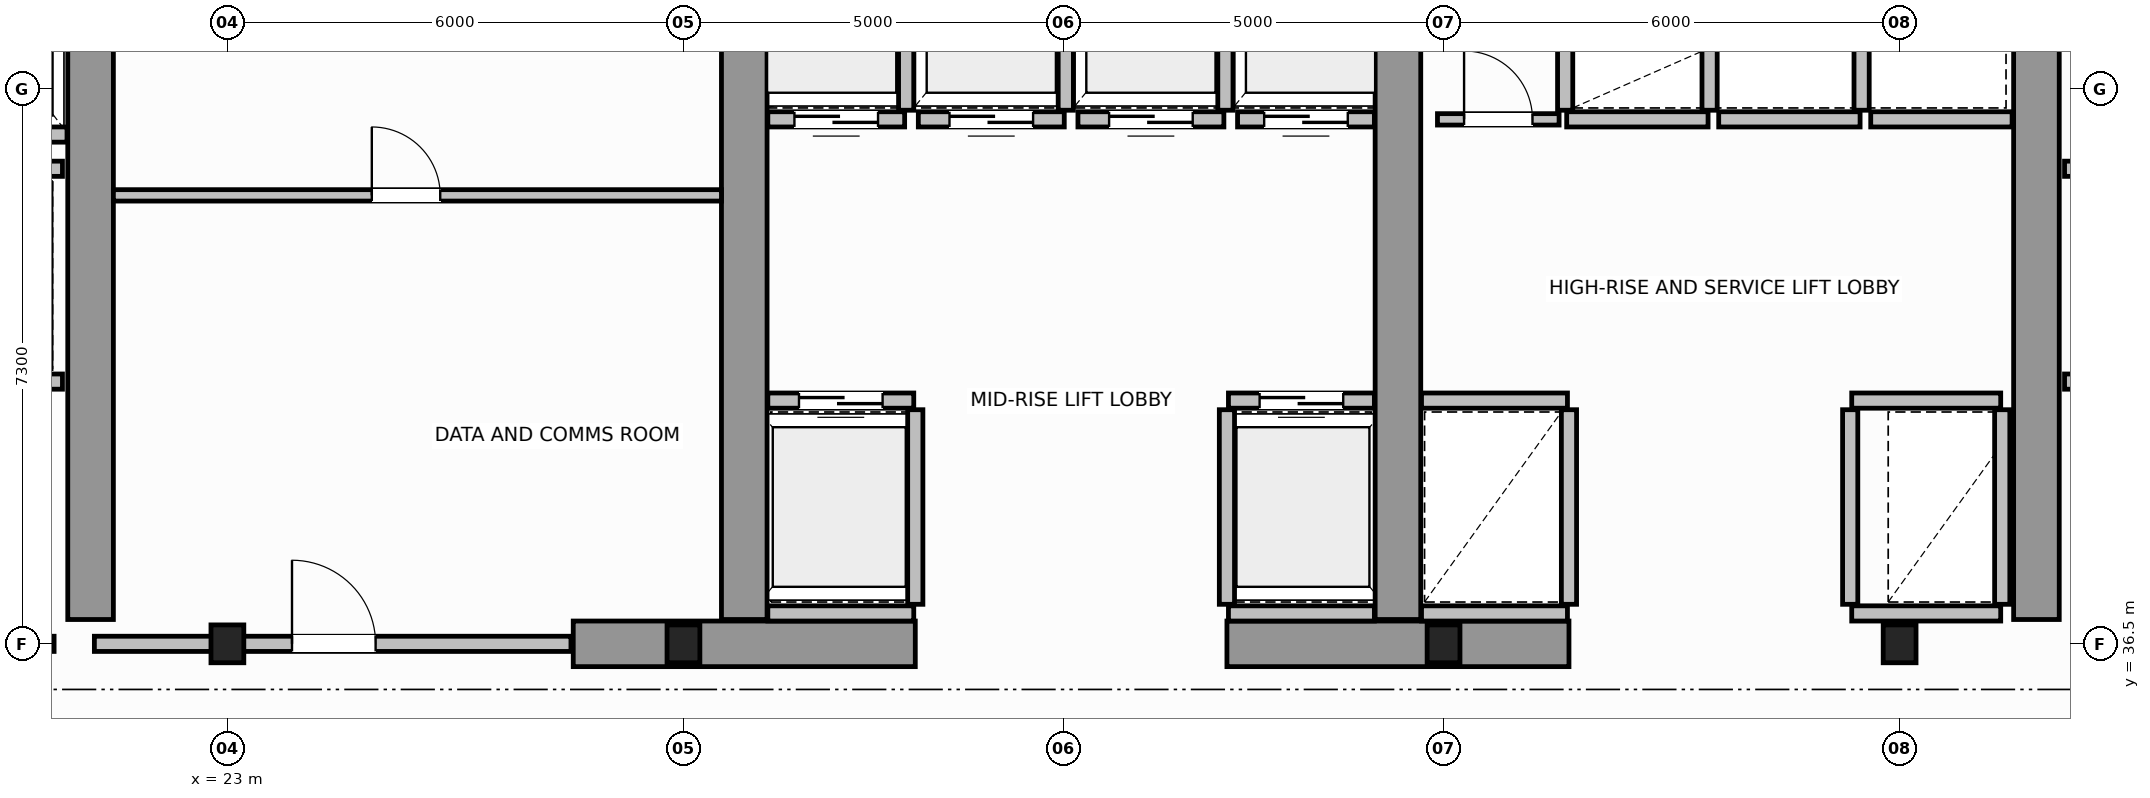
"""IFC4 building model, lengths in metres.
Left out: names, types, materials, properties, quantities, classifications, styles, units other than length and angle.
Written with IfcOpenShell. Run it as: python <this file> out.ifc"""

import sys

from ifc_helpers import new_model, si_unit, direction, frame, frame_2d, origin, origin_2d, place, context, subcontext, project, spatial, rectangle, i_section, extrude, source, transform, mapped, element, fill, save


model = new_model("IFC4")
c1 = context("Model", 3, precision=1e-05, world=origin(), true_north=direction((0.0, 1.0)))
c2 = subcontext(c1, "Body", "Model", "MODEL_VIEW")
j1 = project(units=[si_unit("LENGTHUNIT", "METRE"), si_unit("PLANEANGLEUNIT", "RADIAN")], contexts=[c1])
p1 = place(None, origin())
s1 = spatial("IfcSite", under=j1, at=p1, CompositionType="ELEMENT")
p2 = place(p1, origin())
s2 = spatial("IfcBuilding", under=s1, at=p2, CompositionType="ELEMENT")
p3 = place(p2, frame((0.0, 0.0, 169.0)))
s3 = spatial("IfcBuildingStorey", under=s2, at=p3, CompositionType="ELEMENT", Elevation=169.0)
m1 = source(origin(), c2, "Body", "SweptSolid", [
    extrude(i_section(OverallWidth=0.432, OverallDepth=0.498, WebThickness=0.055, FlangeThickness=0.068, FilletRadius=0.015, at=origin_2d()), origin(), (0.0, 0.0, 1.0), 3.8),
])
for number, where, z_axis, x_axis in (
    (1, (23.0, 36.5, 0.0), (0.0, 0.0, 1.0), (1.0, 0.0, 0.0)),
    (2, (29.0, 36.5, 0.0), (0.0, 0.0, 1.0), (1.0, 0.0, 0.0)),
    (3, (39.0, 36.5, 0.0), (0.0, 0.0, 1.0), (1.0, 0.0, 0.0)),
    (4, (45.0, 36.5, 0.0), (0.0, 0.0, 1.0), (1.0, 0.0, 0.0)),
):
    element("IfcColumn", number, at=place(p3, frame(where, z_axis=z_axis, x_axis=x_axis)), inside=s3, PredefinedType="COLUMN", context=c2, shape_type="MappedRepresentation", body=[
        mapped(m1, transform((0.0, 0.0, 0.0), scale=1.0)),
    ])
for number, where, z_axis, x_axis in (
    (5, (27.55, 36.5, 0.0), (0.0, 0.0, 1.0), (1.0, 0.0, 0.0)),
    (6, (36.15, 36.5, 0.0), (0.0, 0.0, 1.0), (1.0, 0.0, 0.0)),
):
    element("IfcWall", number, at=place(p3, frame(where, z_axis=z_axis, x_axis=x_axis)), inside=s3, PredefinedType="SHEAR", context=c2, shape_type="SweptSolid", body=[
        extrude(rectangle(XDim=4.5, YDim=0.6, at=frame_2d((2.25, 0.0))), origin(), (0.0, 0.0, 1.0), 3.8),
    ])
for number, where, z_axis, x_axis in (
    (7, (21.2, 36.82, 0.0), (0.0, 0.0, 1.0), (0.0, 1.0, 0.0)),
    (8, (29.8, 36.82, 0.0), (0.0, 0.0, 1.0), (0.0, 1.0, 0.0)),
    (9, (38.4, 36.82, 0.0), (0.0, 0.0, 1.0), (0.0, 1.0, 0.0)),
    (10, (46.8, 36.82, 0.0), (0.0, 0.0, 1.0), (0.0, 1.0, 0.0)),
):
    element("IfcWall", number, at=place(p3, frame(where, z_axis=z_axis, x_axis=x_axis)), inside=s3, PredefinedType="SHEAR", context=c2, shape_type="SweptSolid", body=[
        extrude(rectangle(XDim=9.38, YDim=0.6, at=frame_2d((4.69, 0.0))), origin(), (0.0, 0.0, 1.0), 3.8),
    ])
p4 = place(p3, frame((18.25, 36.5, 0.0), z_axis=(0.0, 0.0, 1.0), x_axis=(1.0, 0.0, 0.0)))
e11 = element("IfcWall", 11, at=p4, inside=s3, PredefinedType="SOLIDWALL", context=c2, shape_type="SweptSolid", body=[
    extrude(rectangle(XDim=2.47, YDim=0.2, at=frame_2d((1.235, 0.0))), origin(), (0.0, 0.0, 1.0), 2.57),
])
p5 = place(p4, frame((0.65, 0.0, 0.0)))
e12 = element("IfcOpeningElement", 12, at=p5, cuts=e11, PredefinedType="OPENING", context=c2, shape_type="SweptSolid", body=[
    extrude(rectangle(XDim=1.1, YDim=2.15, at=frame_2d((0.55, 1.075))), frame((0.0, 0.11, 0.0), z_axis=(0.0, -1.0, 0.0), x_axis=(1.0, 0.0, 0.0)), (0.0, 0.0, 1.0), 0.22),
])
p6 = place(p3, frame((30.11, 39.7, 0.0), z_axis=(0.0, 0.0, 1.0), x_axis=(1.0, 0.0, 0.0)))
e13 = element("IfcWall", 13, at=p6, inside=s3, PredefinedType="SOLIDWALL", context=c2, shape_type="SweptSolid", body=[
    extrude(rectangle(XDim=1.92, YDim=0.2, at=frame_2d((0.96, 0.0))), origin(), (0.0, 0.0, 1.0), 3.58),
])
p7 = place(p6, frame((0.41, 0.0, 0.0)))
e14 = element("IfcOpeningElement", 14, at=p7, cuts=e13, PredefinedType="OPENING", context=c2, shape_type="SweptSolid", body=[
    extrude(rectangle(XDim=1.1, YDim=2.15, at=frame_2d((0.55, 1.075))), frame((0.0, 0.11, 0.0), z_axis=(0.0, -1.0, 0.0), x_axis=(1.0, 0.0, 0.0)), (0.0, 0.0, 1.0), 0.22),
])
p8 = place(p3, frame((30.11, 36.9, 0.0), z_axis=(0.0, 0.0, 1.0), x_axis=(1.0, 0.0, 0.0)))
e15 = element("IfcWall", 15, at=p8, inside=s3, PredefinedType="SOLIDWALL", context=c2, shape_type="SweptSolid", body=[
    extrude(rectangle(XDim=1.92, YDim=0.2, at=frame_2d((0.96, 0.0))), origin(), (0.0, 0.0, 1.0), 3.58),
])
p9 = place(p3, frame((32.05, 37.02, 0.0), z_axis=(0.0, 0.0, 1.0), x_axis=(0.0, 1.0, 0.0)))
e16 = element("IfcWall", 16, at=p9, inside=s3, PredefinedType="SOLIDWALL", context=c2, shape_type="SweptSolid", body=[
    extrude(rectangle(XDim=2.56, YDim=0.2, at=frame_2d((1.28, 0.0))), origin(), (0.0, 0.0, 1.0), 3.58),
])
p10 = place(p3, frame((36.17, 39.7, 0.0), z_axis=(0.0, 0.0, 1.0), x_axis=(1.0, 0.0, 0.0)))
e17 = element("IfcWall", 17, at=p10, inside=s3, PredefinedType="SOLIDWALL", context=c2, shape_type="SweptSolid", body=[
    extrude(rectangle(XDim=1.92, YDim=0.2, at=frame_2d((0.96, 0.0))), origin(), (0.0, 0.0, 1.0), 3.58),
])
p11 = place(p10, frame((0.41, 0.0, 0.0)))
e18 = element("IfcOpeningElement", 18, at=p11, cuts=e17, PredefinedType="OPENING", context=c2, shape_type="SweptSolid", body=[
    extrude(rectangle(XDim=1.1, YDim=2.15, at=frame_2d((0.55, 1.075))), frame((0.0, 0.11, 0.0), z_axis=(0.0, -1.0, 0.0), x_axis=(1.0, 0.0, 0.0)), (0.0, 0.0, 1.0), 0.22),
])
p12 = place(p3, frame((36.17, 36.9, 0.0), z_axis=(0.0, 0.0, 1.0), x_axis=(1.0, 0.0, 0.0)))
e19 = element("IfcWall", 19, at=p12, inside=s3, PredefinedType="SOLIDWALL", context=c2, shape_type="SweptSolid", body=[
    extrude(rectangle(XDim=1.92, YDim=0.2, at=frame_2d((0.96, 0.0))), origin(), (0.0, 0.0, 1.0), 3.58),
])
p13 = place(p3, frame((36.15, 37.02, 0.0), z_axis=(0.0, 0.0, 1.0), x_axis=(0.0, 1.0, 0.0)))
e20 = element("IfcWall", 20, at=p13, inside=s3, PredefinedType="SOLIDWALL", context=c2, shape_type="SweptSolid", body=[
    extrude(rectangle(XDim=2.56, YDim=0.2, at=frame_2d((1.28, 0.0))), origin(), (0.0, 0.0, 1.0), 3.58),
])
p14 = place(p3, frame((30.11, 43.4, 0.0), z_axis=(0.0, 0.0, 1.0), x_axis=(1.0, 0.0, 0.0)))
e21 = element("IfcWall", 21, at=p14, inside=s3, PredefinedType="SOLIDWALL", context=c2, shape_type="SweptSolid", body=[
    extrude(rectangle(XDim=1.8, YDim=0.2, at=frame_2d((0.9, 0.0))), origin(), (0.0, 0.0, 1.0), 3.58),
])
p15 = place(p14, frame((0.35, 0.0, 0.0)))
e22 = element("IfcOpeningElement", 22, at=p15, cuts=e21, PredefinedType="OPENING", context=c2, shape_type="SweptSolid", body=[
    extrude(rectangle(XDim=1.1, YDim=2.15, at=frame_2d((0.55, 1.075))), frame((0.0, 0.11, 0.0), z_axis=(0.0, -1.0, 0.0), x_axis=(1.0, 0.0, 0.0)), (0.0, 0.0, 1.0), 0.22),
])
p16 = place(p3, frame((31.93, 43.52, 0.0), z_axis=(0.0, 0.0, 1.0), x_axis=(0.0, 1.0, 0.0)))
e23 = element("IfcWall", 23, at=p16, inside=s3, PredefinedType="SOLIDWALL", context=c2, shape_type="SweptSolid", body=[
    extrude(rectangle(XDim=2.56, YDim=0.2, at=frame_2d((1.28, 0.0))), origin(), (0.0, 0.0, 1.0), 3.58),
])
p17 = place(p3, frame((32.09, 43.4, 0.0), z_axis=(0.0, 0.0, 1.0), x_axis=(1.0, 0.0, 0.0)))
e24 = element("IfcWall", 24, at=p17, inside=s3, PredefinedType="SOLIDWALL", context=c2, shape_type="SweptSolid", body=[
    extrude(rectangle(XDim=1.92, YDim=0.2, at=frame_2d((0.96, 0.0))), origin(), (0.0, 0.0, 1.0), 3.58),
])
p18 = place(p17, frame((0.41, 0.0, 0.0)))
e25 = element("IfcOpeningElement", 25, at=p18, cuts=e24, PredefinedType="OPENING", context=c2, shape_type="SweptSolid", body=[
    extrude(rectangle(XDim=1.1, YDim=2.15, at=frame_2d((0.55, 1.075))), frame((0.0, 0.11, 0.0), z_axis=(0.0, -1.0, 0.0), x_axis=(1.0, 0.0, 0.0)), (0.0, 0.0, 1.0), 0.22),
])
p19 = place(p3, frame((34.03, 43.52, 0.0), z_axis=(0.0, 0.0, 1.0), x_axis=(0.0, 1.0, 0.0)))
e26 = element("IfcWall", 26, at=p19, inside=s3, PredefinedType="SOLIDWALL", context=c2, shape_type="SweptSolid", body=[
    extrude(rectangle(XDim=2.56, YDim=0.2, at=frame_2d((1.28, 0.0))), origin(), (0.0, 0.0, 1.0), 3.58),
])
p20 = place(p3, frame((34.19, 43.4, 0.0), z_axis=(0.0, 0.0, 1.0), x_axis=(1.0, 0.0, 0.0)))
e27 = element("IfcWall", 27, at=p20, inside=s3, PredefinedType="SOLIDWALL", context=c2, shape_type="SweptSolid", body=[
    extrude(rectangle(XDim=1.92, YDim=0.2, at=frame_2d((0.96, 0.0))), origin(), (0.0, 0.0, 1.0), 3.58),
])
p21 = place(p20, frame((0.41, 0.0, 0.0)))
e28 = element("IfcOpeningElement", 28, at=p21, cuts=e27, PredefinedType="OPENING", context=c2, shape_type="SweptSolid", body=[
    extrude(rectangle(XDim=1.1, YDim=2.15, at=frame_2d((0.55, 1.075))), frame((0.0, 0.11, 0.0), z_axis=(0.0, -1.0, 0.0), x_axis=(1.0, 0.0, 0.0)), (0.0, 0.0, 1.0), 0.22),
])
p22 = place(p3, frame((36.13, 43.52, 0.0), z_axis=(0.0, 0.0, 1.0), x_axis=(0.0, 1.0, 0.0)))
e29 = element("IfcWall", 29, at=p22, inside=s3, PredefinedType="SOLIDWALL", context=c2, shape_type="SweptSolid", body=[
    extrude(rectangle(XDim=2.56, YDim=0.2, at=frame_2d((1.28, 0.0))), origin(), (0.0, 0.0, 1.0), 3.58),
])
p23 = place(p3, frame((36.29, 43.4, 0.0), z_axis=(0.0, 0.0, 1.0), x_axis=(1.0, 0.0, 0.0)))
e30 = element("IfcWall", 30, at=p23, inside=s3, PredefinedType="SOLIDWALL", context=c2, shape_type="SweptSolid", body=[
    extrude(rectangle(XDim=1.8, YDim=0.2, at=frame_2d((0.9, 0.0))), origin(), (0.0, 0.0, 1.0), 3.58),
])
p24 = place(p23, frame((0.35, 0.0, 0.0)))
e31 = element("IfcOpeningElement", 31, at=p24, cuts=e30, PredefinedType="OPENING", context=c2, shape_type="SweptSolid", body=[
    extrude(rectangle(XDim=1.1, YDim=2.15, at=frame_2d((0.55, 1.075))), frame((0.0, 0.11, 0.0), z_axis=(0.0, -1.0, 0.0), x_axis=(1.0, 0.0, 0.0)), (0.0, 0.0, 1.0), 0.22),
])
for number, where, z_axis, x_axis in (
    (32, (38.71, 39.7, 0.0), (0.0, 0.0, 1.0), (1.0, 0.0, 0.0)),
    (33, (38.71, 36.9, 0.0), (0.0, 0.0, 1.0), (1.0, 0.0, 0.0)),
):
    element("IfcWall", number, at=place(p3, frame(where, z_axis=z_axis, x_axis=x_axis)), inside=s3, PredefinedType="SOLIDWALL", context=c2, shape_type="SweptSolid", body=[
        extrude(rectangle(XDim=1.92, YDim=0.2, at=frame_2d((0.96, 0.0))), origin(), (0.0, 0.0, 1.0), 3.58),
    ])
p25 = place(p3, frame((40.65, 37.02, 0.0), z_axis=(0.0, 0.0, 1.0), x_axis=(0.0, 1.0, 0.0)))
e34 = element("IfcWall", 34, at=p25, inside=s3, PredefinedType="SOLIDWALL", context=c2, shape_type="SweptSolid", body=[
    extrude(rectangle(XDim=2.56, YDim=0.2, at=frame_2d((1.28, 0.0))), origin(), (0.0, 0.0, 1.0), 3.58),
])
p26 = place(p3, frame((44.37, 39.7, 0.0), z_axis=(0.0, 0.0, 1.0), x_axis=(1.0, 0.0, 0.0)))
e35 = element("IfcWall", 35, at=p26, inside=s3, PredefinedType="SOLIDWALL", context=c2, shape_type="SweptSolid", body=[
    extrude(rectangle(XDim=1.96, YDim=0.2, at=frame_2d((0.98, 0.0))), origin(), (0.0, 0.0, 1.0), 3.58),
])
p27 = place(p3, frame((44.37, 36.9, 0.0), z_axis=(0.0, 0.0, 1.0), x_axis=(1.0, 0.0, 0.0)))
e36 = element("IfcWall", 36, at=p27, inside=s3, PredefinedType="SOLIDWALL", context=c2, shape_type="SweptSolid", body=[
    extrude(rectangle(XDim=1.96, YDim=0.2, at=frame_2d((0.98, 0.0))), origin(), (0.0, 0.0, 1.0), 2.57),
])
for number, where, z_axis, x_axis in (
    (37, (44.35, 37.02, 0.0), (0.0, 0.0, 1.0), (0.0, 1.0, 0.0)),
    (38, (46.35, 37.02, 0.0), (0.0, 0.0, 1.0), (0.0, 1.0, 0.0)),
):
    element("IfcWall", number, at=place(p3, frame(where, z_axis=z_axis, x_axis=x_axis)), inside=s3, PredefinedType="SOLIDWALL", context=c2, shape_type="SweptSolid", body=[
        extrude(rectangle(XDim=2.56, YDim=0.2, at=frame_2d((1.28, 0.0))), origin(), (0.0, 0.0, 1.0), 3.58),
    ])
p28 = place(p3, frame((40.62, 43.4, 0.0), z_axis=(0.0, 0.0, 1.0), x_axis=(1.0, 0.0, 0.0)))
e39 = element("IfcWall", 39, at=p28, inside=s3, PredefinedType="SOLIDWALL", context=c2, shape_type="SweptSolid", body=[
    extrude(rectangle(XDim=1.86, YDim=0.2, at=frame_2d((0.93, 0.0))), origin(), (0.0, 0.0, 1.0), 3.58),
])
for number, where, z_axis, x_axis in (
    (40, (40.6, 43.52, 0.0), (0.0, 0.0, 1.0), (0.0, 1.0, 0.0)),
    (41, (42.5, 43.52, 0.0), (0.0, 0.0, 1.0), (0.0, 1.0, 0.0)),
):
    element("IfcWall", number, at=place(p3, frame(where, z_axis=z_axis, x_axis=x_axis)), inside=s3, PredefinedType="SOLIDWALL", context=c2, shape_type="SweptSolid", body=[
        extrude(rectangle(XDim=2.56, YDim=0.2, at=frame_2d((1.28, 0.0))), origin(), (0.0, 0.0, 1.0), 3.58),
    ])
p29 = place(p3, frame((42.62, 43.4, 0.0), z_axis=(0.0, 0.0, 1.0), x_axis=(1.0, 0.0, 0.0)))
e42 = element("IfcWall", 42, at=p29, inside=s3, PredefinedType="SOLIDWALL", context=c2, shape_type="SweptSolid", body=[
    extrude(rectangle(XDim=1.86, YDim=0.2, at=frame_2d((0.93, 0.0))), origin(), (0.0, 0.0, 1.0), 3.58),
])
p30 = place(p3, frame((44.5, 43.52, 0.0), z_axis=(0.0, 0.0, 1.0), x_axis=(0.0, 1.0, 0.0)))
e43 = element("IfcWall", 43, at=p30, inside=s3, PredefinedType="SOLIDWALL", context=c2, shape_type="SweptSolid", body=[
    extrude(rectangle(XDim=2.56, YDim=0.2, at=frame_2d((1.28, 0.0))), origin(), (0.0, 0.0, 1.0), 3.58),
])
p31 = place(p3, frame((44.62, 43.4, 0.0), z_axis=(0.0, 0.0, 1.0), x_axis=(1.0, 0.0, 0.0)))
e44 = element("IfcWall", 44, at=p31, inside=s3, PredefinedType="SOLIDWALL", context=c2, shape_type="SweptSolid", body=[
    extrude(rectangle(XDim=1.86, YDim=0.2, at=frame_2d((0.93, 0.0))), origin(), (0.0, 0.0, 1.0), 3.58),
])
p32 = place(p3, frame((18.67, 43.2, 0.0), z_axis=(0.0, 0.0, 1.0), x_axis=(1.0, 0.0, 0.0)))
e45 = element("IfcWall", 45, at=p32, inside=s3, PredefinedType="SOLIDWALL", context=c2, shape_type="SweptSolid", body=[
    extrude(rectangle(XDim=2.22, YDim=0.2, at=frame_2d((1.11, 0.0))), origin(), (0.0, 0.0, 1.0), 3.58),
])
p33 = place(p3, frame((18.67, 39.95, 0.0), z_axis=(0.0, 0.0, 1.0), x_axis=(1.0, 0.0, 0.0)))
e46 = element("IfcWall", 46, at=p33, inside=s3, PredefinedType="SOLIDWALL", context=c2, shape_type="SweptSolid", body=[
    extrude(rectangle(XDim=2.16, YDim=0.2, at=frame_2d((1.08, 0.0))), origin(), (0.0, 0.0, 1.0), 3.58),
])
p34 = place(p33, frame((0.53, 0.0, 0.0)))
e47 = element("IfcOpeningElement", 47, at=p34, cuts=e46, PredefinedType="OPENING", context=c2, shape_type="SweptSolid", body=[
    extrude(rectangle(XDim=1.1, YDim=2.15, at=frame_2d((0.55, 1.075))), frame((0.0, 0.11, 0.0), z_axis=(0.0, -1.0, 0.0), x_axis=(1.0, 0.0, 0.0)), (0.0, 0.0, 1.0), 0.22),
])
p35 = place(p3, frame((18.67, 42.75, 0.0), z_axis=(0.0, 0.0, 1.0), x_axis=(1.0, 0.0, 0.0)))
e48 = element("IfcWall", 48, at=p35, inside=s3, PredefinedType="SOLIDWALL", context=c2, shape_type="SweptSolid", body=[
    extrude(rectangle(XDim=2.16, YDim=0.2, at=frame_2d((1.08, 0.0))), origin(), (0.0, 0.0, 1.0), 3.58),
])
p36 = place(p3, frame((47.17, 39.95, 0.0), z_axis=(0.0, 0.0, 1.0), x_axis=(1.0, 0.0, 0.0)))
e49 = element("IfcWall", 49, at=p36, inside=s3, PredefinedType="SOLIDWALL", context=c2, shape_type="SweptSolid", body=[
    extrude(rectangle(XDim=2.16, YDim=0.2, at=frame_2d((1.08, 0.0))), origin(), (0.0, 0.0, 1.0), 3.58),
])
p37 = place(p36, frame((0.53, 0.0, 0.0)))
e50 = element("IfcOpeningElement", 50, at=p37, cuts=e49, PredefinedType="OPENING", context=c2, shape_type="SweptSolid", body=[
    extrude(rectangle(XDim=1.1, YDim=2.15, at=frame_2d((0.55, 1.075))), frame((0.0, 0.11, 0.0), z_axis=(0.0, -1.0, 0.0), x_axis=(1.0, 0.0, 0.0)), (0.0, 0.0, 1.0), 0.22),
])
p38 = place(p3, frame((47.17, 42.75, 0.0), z_axis=(0.0, 0.0, 1.0), x_axis=(1.0, 0.0, 0.0)))
e51 = element("IfcWall", 51, at=p38, inside=s3, PredefinedType="SOLIDWALL", context=c2, shape_type="SweptSolid", body=[
    extrude(rectangle(XDim=2.16, YDim=0.2, at=frame_2d((1.08, 0.0))), origin(), (0.0, 0.0, 1.0), 3.58),
])
p39 = place(p3, frame((21.25, 36.5, 0.0), z_axis=(0.0, 0.0, 1.0), x_axis=(1.0, 0.0, 0.0)))
e52 = element("IfcWall", 52, at=p39, inside=s3, PredefinedType="SOLIDWALL", context=c2, shape_type="SweptSolid", body=[
    extrude(rectangle(XDim=6.27, YDim=0.2, at=frame_2d((3.135, 0.0))), origin(), (0.0, 0.0, 1.0), 2.57),
])
p40 = place(p39, frame((2.6, 0.0, 0.0)))
e53 = element("IfcOpeningElement", 53, at=p40, cuts=e52, PredefinedType="OPENING", context=c2, shape_type="SweptSolid", body=[
    extrude(rectangle(XDim=1.1, YDim=2.15, at=frame_2d((0.55, 1.075))), frame((0.0, 0.11, 0.0), z_axis=(0.0, -1.0, 0.0), x_axis=(1.0, 0.0, 0.0)), (0.0, 0.0, 1.0), 0.22),
])
p41 = place(p3, frame((21.5, 42.4, 0.0), z_axis=(0.0, 0.0, 1.0), x_axis=(1.0, 0.0, 0.0)))
e54 = element("IfcWall", 54, at=p41, inside=s3, PredefinedType="PARTITIONING", context=c2, shape_type="SweptSolid", body=[
    extrude(rectangle(XDim=8.0, YDim=0.15, at=frame_2d((4.0, 0.0))), origin(), (0.0, 0.0, 1.0), 3.58),
])
p42 = place(p41, frame((3.4, 0.0, 0.0)))
e55 = element("IfcOpeningElement", 55, at=p42, cuts=e54, PredefinedType="OPENING", context=c2, shape_type="SweptSolid", body=[
    extrude(rectangle(XDim=0.9, YDim=2.1, at=frame_2d((0.45, 1.05))), frame((0.0, 0.085, 0.0), z_axis=(0.0, -1.0, 0.0), x_axis=(1.0, 0.0, 0.0)), (0.0, 0.0, 1.0), 0.17),
])
p43 = place(p3, frame((38.92, 43.4, 0.0), z_axis=(0.0, 0.0, 1.0), x_axis=(1.0, 0.0, 0.0)))
e56 = element("IfcWall", 56, at=p43, inside=s3, PredefinedType="PARTITIONING", context=c2, shape_type="SweptSolid", body=[
    extrude(rectangle(XDim=1.6, YDim=0.15, at=frame_2d((0.8, 0.0))), origin(), (0.0, 0.0, 1.0), 3.58),
])
p44 = place(p43, frame((0.35, 0.0, 0.0)))
e57 = element("IfcOpeningElement", 57, at=p44, cuts=e56, PredefinedType="OPENING", context=c2, shape_type="SweptSolid", body=[
    extrude(rectangle(XDim=0.9, YDim=2.1, at=frame_2d((0.45, 1.05))), frame((0.0, 0.085, 0.0), z_axis=(0.0, -1.0, 0.0), x_axis=(1.0, 0.0, 0.0)), (0.0, 0.0, 1.0), 0.17),
])
m2 = source(origin(), c2, "Body", "SweptSolid", [
    extrude(rectangle(XDim=1.1, YDim=2.15, at=frame_2d((0.55, 1.075))), frame((0.0, 0.025, 0.0), z_axis=(0.0, -1.0, 0.0), x_axis=(1.0, 0.0, 0.0)), (0.0, 0.0, 1.0), 0.05),
])
p45 = place(p7, origin())
e58 = element("IfcDoor", 58, at=p45, inside=s3, OperationType="DOUBLE_DOOR_SLIDING", PredefinedType="DOOR", context=c2, shape_type="MappedRepresentation", body=[
    mapped(m2, transform((0.0, 0.0, 0.0), scale=1.0)),
])
fill(e14, e58)
p46 = place(p11, origin())
e59 = element("IfcDoor", 59, at=p46, inside=s3, OperationType="DOUBLE_DOOR_SLIDING", PredefinedType="DOOR", context=c2, shape_type="MappedRepresentation", body=[
    mapped(m2, transform((0.0, 0.0, 0.0), scale=1.0)),
])
fill(e18, e59)
p47 = place(p15, origin())
e60 = element("IfcDoor", 60, at=p47, inside=s3, OperationType="DOUBLE_DOOR_SLIDING", PredefinedType="DOOR", context=c2, shape_type="MappedRepresentation", body=[
    mapped(m2, transform((0.0, 0.0, 0.0), scale=1.0)),
])
fill(e22, e60)
p48 = place(p18, origin())
e61 = element("IfcDoor", 61, at=p48, inside=s3, OperationType="DOUBLE_DOOR_SLIDING", PredefinedType="DOOR", context=c2, shape_type="MappedRepresentation", body=[
    mapped(m2, transform((0.0, 0.0, 0.0), scale=1.0)),
])
fill(e25, e61)
p49 = place(p21, origin())
e62 = element("IfcDoor", 62, at=p49, inside=s3, OperationType="DOUBLE_DOOR_SLIDING", PredefinedType="DOOR", context=c2, shape_type="MappedRepresentation", body=[
    mapped(m2, transform((0.0, 0.0, 0.0), scale=1.0)),
])
fill(e28, e62)
p50 = place(p24, origin())
e63 = element("IfcDoor", 63, at=p50, inside=s3, OperationType="DOUBLE_DOOR_SLIDING", PredefinedType="DOOR", context=c2, shape_type="MappedRepresentation", body=[
    mapped(m2, transform((0.0, 0.0, 0.0), scale=1.0)),
])
fill(e31, e63)
p51 = place(p40, origin())
e64 = element("IfcDoor", 64, at=p51, inside=s3, OperationType="SINGLE_SWING_LEFT", PredefinedType="DOOR", context=c2, shape_type="MappedRepresentation", body=[
    mapped(m2, transform((0.0, 0.0, 0.0), scale=1.0)),
])
fill(e53, e64)
m3 = source(origin(), c2, "Body", "SweptSolid", [
    extrude(rectangle(XDim=0.9, YDim=2.1, at=frame_2d((0.45, 1.05))), frame((0.0, 0.025, 0.0), z_axis=(0.0, -1.0, 0.0), x_axis=(1.0, 0.0, 0.0)), (0.0, 0.0, 1.0), 0.05),
])
p52 = place(p42, origin())
e65 = element("IfcDoor", 65, at=p52, inside=s3, OperationType="SINGLE_SWING_RIGHT", PredefinedType="DOOR", context=c2, shape_type="MappedRepresentation", body=[
    mapped(m3, transform((0.0, 0.0, 0.0), scale=1.0)),
])
fill(e55, e65)
p53 = place(p44, origin())
e66 = element("IfcDoor", 66, at=p53, inside=s3, OperationType="SINGLE_SWING_LEFT", PredefinedType="DOOR", context=c2, shape_type="MappedRepresentation", body=[
    mapped(m3, transform((0.0, 0.0, 0.0), scale=1.0)),
])
fill(e57, e66)
save(model, sys.argv[1])
